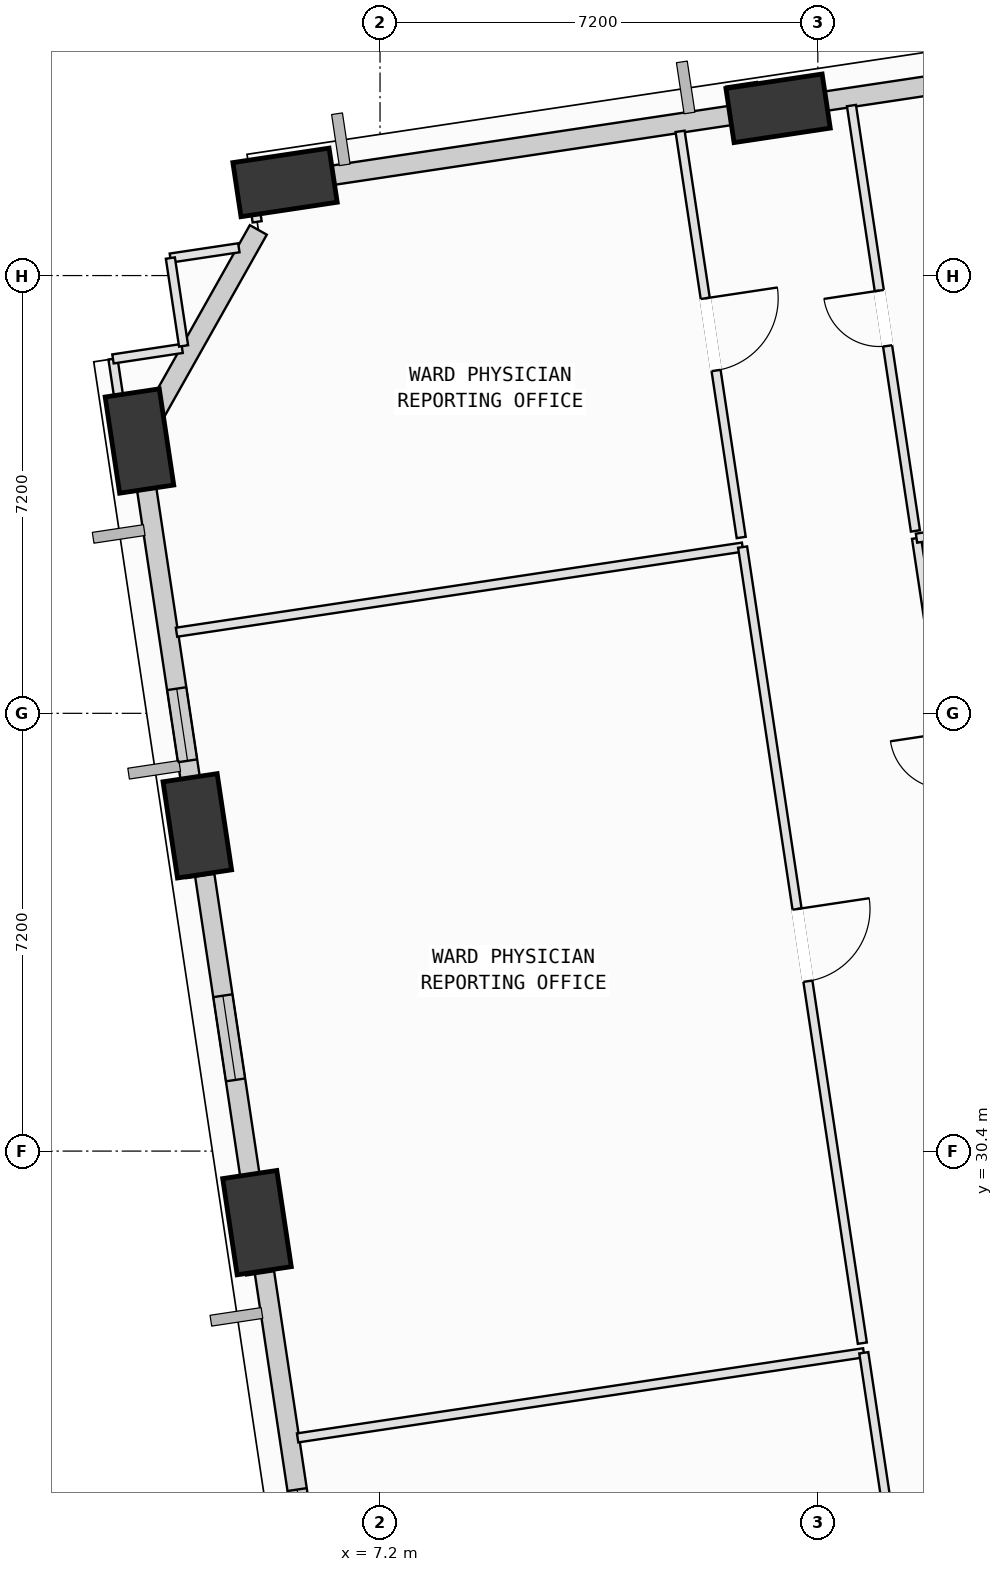
"""IFC4 building model, lengths in metres.
Left out: names, types, materials, properties, quantities, classifications, styles, units other than length and angle.
Written with IfcOpenShell. Run it as: python <this file> out.ifc"""

import sys

from ifc_helpers import new_model, si_unit, direction, frame, frame_2d, origin, origin_2d, place, context, subcontext, project, spatial, rectangle, extrude, element, fill, save


model = new_model("IFC4")
c1 = context("Model", 3, precision=1e-05, world=origin(), true_north=direction((0.0, 1.0)))
c2 = subcontext(c1, "Body", "Model", "MODEL_VIEW")
j1 = project(units=[si_unit("LENGTHUNIT", "METRE"), si_unit("PLANEANGLEUNIT", "RADIAN")], contexts=[c1])
p1 = place(None, origin())
s1 = spatial("IfcSite", under=j1, at=p1, CompositionType="ELEMENT")
p2 = place(p1, origin())
s2 = spatial("IfcBuilding", under=s1, at=p2, CompositionType="ELEMENT")
p3 = place(p2, frame((0.0, 0.0, 59.0)))
s3 = spatial("IfcBuildingStorey", under=s2, at=p3, CompositionType="ELEMENT", Elevation=59.0)
p4 = place(p3, frame((13.747, 47.551, 0.002), z_axis=(-0.092921619704, -0.082435357337, 0.992254999711), x_axis=(0.766615105201, -0.64184127574, 0.018467734958)))
e1 = element("IfcColumn", 1, at=p4, inside=s3, PredefinedType="COLUMN", context=c2, shape_type="SweptSolid", body=[
    extrude(rectangle(XDim=1.6, YDim=0.9, at=origin_2d()), origin(), (0.0, 0.0, 1.0), 4.028),
])
p5 = place(p3, frame((5.638, 46.332, 0.002), z_axis=(-0.087401375446, -0.115447183335, 0.989460937799), x_axis=(0.877219279252, -0.479607017273, 0.021527774881)))
e2 = element("IfcColumn", 2, at=p5, inside=s3, PredefinedType="COLUMN", context=c2, shape_type="SweptSolid", body=[
    extrude(rectangle(XDim=1.6, YDim=0.9, at=origin_2d()), origin(), (0.0, 0.0, 1.0), 4.039),
])
p6 = place(p3, frame((3.244, 42.079, 0.002), z_axis=(-0.06982815003, -0.125086097327, 0.989685554971), x_axis=(0.347229843734, 0.927018097082, 0.141664686156)))
e3 = element("IfcColumn", 3, at=p6, inside=s3, PredefinedType="COLUMN", context=c2, shape_type="SweptSolid", body=[
    extrude(rectangle(XDim=1.6, YDim=0.9, at=origin_2d()), origin(), (0.0, 0.0, 1.0), 4.038),
])
p7 = place(p3, frame((4.195, 35.75, 0.002), z_axis=(-0.043979168177, -0.121215310638, 0.991651491822), x_axis=(0.194699822044, 0.972539038983, 0.127513908846)))
e4 = element("IfcColumn", 4, at=p7, inside=s3, PredefinedType="COLUMN", context=c2, shape_type="SweptSolid", body=[
    extrude(rectangle(XDim=1.6, YDim=0.9, at=origin_2d()), origin(), (0.0, 0.0, 1.0), 4.03),
])
p8 = place(p3, frame((5.177, 29.223, 0.002), z_axis=(-0.017226797387, -0.117130090682, 0.99296715923), x_axis=(-0.00421044589, 0.993114222476, 0.117074391996)))
e5 = element("IfcColumn", 5, at=p8, inside=s3, PredefinedType="COLUMN", context=c2, shape_type="SweptSolid", body=[
    extrude(rectangle(XDim=1.6, YDim=0.9, at=origin_2d()), origin(), (0.0, 0.0, 1.0), 4.025),
])
p9 = place(p3, frame((14.125, 47.608, 0.0), z_axis=(0.0, 0.0, 1.0), x_axis=(0.988884639761, 0.1486847983, 0.0)))
e6 = element("IfcWall", 6, at=p9, inside=s3, PredefinedType="SOLIDWALL", context=c2, shape_type="SweptSolid", body=[
    extrude(rectangle(XDim=7.003, YDim=0.32, at=frame_2d((3.501, 0.0))), origin(), (0.0, 0.0, 1.0), 3.165),
])
p10 = place(p3, frame((5.997, 46.386, 0.0), z_axis=(0.0, 0.0, 1.0), x_axis=(0.988885892839, 0.14867646399, 0.0)))
e7 = element("IfcWall", 7, at=p10, inside=s3, PredefinedType="SOLIDWALL", context=c2, shape_type="SweptSolid", body=[
    extrude(rectangle(XDim=7.035, YDim=0.32, at=frame_2d((3.517, 0.0))), origin(), (0.0, 0.0, 1.0), 3.165),
])
p11 = place(p3, frame((3.4, 42.356, 0.0), z_axis=(0.0, 0.0, 1.0), x_axis=(0.490548940901, 0.871413642641, 0.0)))
e8 = element("IfcWall", 8, at=p11, inside=s3, PredefinedType="SOLIDWALL", context=c2, shape_type="SweptSolid", body=[
    extrude(rectangle(XDim=3.666, YDim=0.32, at=frame_2d((1.833, 0.0))), origin(), (0.0, 0.0, 1.0), 3.165),
])
p12 = place(p3, frame((4.141, 36.112, 0.0), z_axis=(0.0, 0.0, 1.0), x_axis=(-0.14868786964, 0.988884177961, 0.0)))
e9 = element("IfcWall", 9, at=p12, inside=s3, PredefinedType="SOLIDWALL", context=c2, shape_type="SweptSolid", body=[
    extrude(rectangle(XDim=5.223, YDim=0.32, at=frame_2d((2.612, 0.0))), origin(), (0.0, 0.0, 1.0), 3.165),
])
p13 = place(p12, frame((0.715, 0.0, 0.75)))
e10 = element("IfcOpeningElement", 10, at=p13, cuts=e9, PredefinedType="OPENING", context=c2, shape_type="SweptSolid", body=[
    extrude(rectangle(XDim=1.2, YDim=1.75, at=frame_2d((0.6, 0.875))), frame((0.0, 0.17, 0.0), z_axis=(0.0, -1.0, 0.0), x_axis=(1.0, 0.0, 0.0)), (0.0, 0.0, 1.0), 0.34),
])
p14 = place(p3, frame((5.121, 29.595, 0.0), z_axis=(0.0, 0.0, 1.0), x_axis=(-0.148683082454, 0.988884897747, 0.0)))
e11 = element("IfcWall", 11, at=p14, inside=s3, PredefinedType="SOLIDWALL", context=c2, shape_type="SweptSolid", body=[
    extrude(rectangle(XDim=5.401, YDim=0.32, at=frame_2d((2.7, 0.0))), origin(), (0.0, 0.0, 1.0), 3.165),
])
p15 = place(p14, frame((1.998, 0.0, 0.75)))
e12 = element("IfcOpeningElement", 12, at=p15, cuts=e11, PredefinedType="OPENING", context=c2, shape_type="SweptSolid", body=[
    extrude(rectangle(XDim=1.4, YDim=1.85, at=frame_2d((0.7, 0.925))), frame((0.0, 0.17, 0.0), z_axis=(0.0, -1.0, 0.0), x_axis=(1.0, 0.0, 0.0)), (0.0, 0.0, 1.0), 0.34),
])
p16 = place(p3, frame((6.109, 23.023, 0.0), z_axis=(0.0, 0.0, 1.0), x_axis=(-0.148652196075, 0.988889541153, 0.0)))
e13 = element("IfcWall", 13, at=p16, inside=s3, PredefinedType="SOLIDWALL", context=c2, shape_type="SweptSolid", body=[
    extrude(rectangle(XDim=5.438, YDim=0.32, at=frame_2d((2.719, 0.0))), origin(), (0.0, 0.0, 1.0), 3.165),
])
p17 = place(p16, frame((0.63, 0.0, 0.75)))
e14 = element("IfcOpeningElement", 14, at=p17, cuts=e13, PredefinedType="OPENING", context=c2, shape_type="SweptSolid", body=[
    extrude(rectangle(XDim=1.2, YDim=1.75, at=frame_2d((0.6, 0.875))), frame((0.0, 0.17, 0.0), z_axis=(0.0, -1.0, 0.0), x_axis=(1.0, 0.0, 0.0)), (0.0, 0.0, 1.0), 0.34),
])
p18 = place(p3, frame((5.845, 25.683, 0.0), z_axis=(0.0, 0.0, 1.0), x_axis=(0.988885704997, 0.148677713369, 0.0)))
e15 = element("IfcWall", 15, at=p18, inside=s3, PredefinedType="PARTITIONING", context=c2, shape_type="SweptSolid", body=[
    extrude(rectangle(XDim=9.416, YDim=0.15, at=frame_2d((4.708, 0.0))), origin(), (0.0, 0.0, 1.0), 3.78),
])
p19 = place(p3, frame((15.156, 27.083, 0.0), z_axis=(0.0, 0.0, 1.0), x_axis=(0.148580091248, -0.988900377432, 0.0)))
e16 = element("IfcWall", 16, at=p19, inside=s3, PredefinedType="PARTITIONING", context=c2, shape_type="SweptSolid", body=[
    extrude(rectangle(XDim=6.576, YDim=0.15, at=frame_2d((3.288, 0.0))), origin(), (0.0, 0.0, 1.0), 3.78),
])
p20 = place(p3, frame((3.853, 38.934, 0.0), z_axis=(0.0, 0.0, 1.0), x_axis=(0.988883411983, 0.148692963872, 0.0)))
e17 = element("IfcWall", 17, at=p20, inside=s3, PredefinedType="PARTITIONING", context=c2, shape_type="SweptSolid", body=[
    extrude(rectangle(XDim=9.415, YDim=0.15, at=frame_2d((4.708, 0.0))), origin(), (0.0, 0.0, 1.0), 3.78),
])
p21 = place(p3, frame((13.163, 40.334, 0.0), z_axis=(0.0, 0.0, 1.0), x_axis=(0.148712834823, -0.988880423893, 0.0)))
e18 = element("IfcWall", 18, at=p21, inside=s3, PredefinedType="PARTITIONING", context=c2, shape_type="SweptSolid", body=[
    extrude(rectangle(XDim=13.24, YDim=0.15, at=frame_2d((6.62, 0.0))), origin(), (0.0, 0.0, 1.0), 2.865),
])
p22 = place(p21, frame((6.02, 0.0, 0.0)))
e19 = element("IfcOpeningElement", 19, at=p22, cuts=e18, PredefinedType="OPENING", context=c2, shape_type="SweptSolid", body=[
    extrude(rectangle(XDim=1.2, YDim=2.15, at=frame_2d((0.6, 1.075))), frame((0.0, 0.085, 0.0), z_axis=(0.0, -1.0, 0.0), x_axis=(1.0, 0.0, 0.0)), (0.0, 0.0, 1.0), 0.17),
])
p23 = place(p3, frame((5.072, 28.366, 0.0), z_axis=(0.0, 0.0, 1.0), x_axis=(-0.148093458743, 0.988973370459, 0.0)))
e20 = element("IfcWall", 20, at=p23, inside=s3, PredefinedType="PARTITIONING", context=c2, shape_type="SweptSolid", body=[
    extrude(rectangle(XDim=1.208, YDim=0.15, at=frame_2d((0.604, 0.0))), origin(), (0.0, 0.0, 1.0), 3.165),
])
p24 = place(p3, frame((4.09, 34.901, 0.0), z_axis=(0.0, 0.0, 1.0), x_axis=(-0.148711563155, 0.988880615132, 0.0)))
e21 = element("IfcWall", 21, at=p24, inside=s3, PredefinedType="PARTITIONING", context=c2, shape_type="SweptSolid", body=[
    extrude(rectangle(XDim=1.19, YDim=0.15, at=frame_2d((0.595, 0.0))), origin(), (0.0, 0.0, 1.0), 3.165),
])
p25 = place(p3, frame((3.752, 45.088, 0.0), z_axis=(0.0, 0.0, 1.0), x_axis=(0.988898574791, 0.148592088537, 0.0)))
e22 = element("IfcWall", 22, at=p25, inside=s3, PredefinedType="PARTITIONING", context=c2, shape_type="SweptSolid", body=[
    extrude(rectangle(XDim=1.139, YDim=0.15, at=frame_2d((0.569, 0.0))), origin(), (0.0, 0.0, 1.0), 3.78),
])
p26 = place(p3, frame((5.179, 45.684, 0.0), z_axis=(0.0, 0.0, 1.0), x_axis=(-0.148050860535, 0.988979748374, 0.0)))
e23 = element("IfcWall", 23, at=p26, inside=s3, PredefinedType="PARTITIONING", context=c2, shape_type="SweptSolid", body=[
    extrude(rectangle(XDim=0.742, YDim=0.15, at=frame_2d((0.371, 0.0))), origin(), (0.0, 0.0, 1.0), 2.865),
])
p27 = place(p3, frame((5.069, 46.418, 0.0), z_axis=(0.0, 0.0, 1.0), x_axis=(0.9888459469, 0.1489419125, 0.0)))
e24 = element("IfcWall", 24, at=p27, inside=s3, PredefinedType="PARTITIONING", context=c2, shape_type="SweptSolid", body=[
    extrude(rectangle(XDim=0.913, YDim=0.15, at=frame_2d((0.457, 0.0))), origin(), (0.0, 0.0, 1.0), 3.78),
])
p28 = place(p3, frame((12.135, 47.172, 0.0), z_axis=(0.0, 0.0, 1.0), x_axis=(0.14875397829, -0.988874235655, 0.0)))
e25 = element("IfcWall", 25, at=p28, inside=s3, PredefinedType="PARTITIONING", context=c2, shape_type="SweptSolid", body=[
    extrude(rectangle(XDim=6.755, YDim=0.15, at=frame_2d((3.378, 0.0))), origin(), (0.0, 0.0, 1.0), 2.865),
])
p29 = place(p28, frame((2.778, 0.0, 0.0)))
e26 = element("IfcOpeningElement", 26, at=p29, cuts=e25, PredefinedType="OPENING", context=c2, shape_type="SweptSolid", body=[
    extrude(rectangle(XDim=1.2, YDim=2.15, at=frame_2d((0.6, 1.075))), frame((0.0, 0.085, 0.0), z_axis=(0.0, -1.0, 0.0), x_axis=(1.0, 0.0, 0.0)), (0.0, 0.0, 1.0), 0.17),
])
p30 = place(p3, frame((3.137, 41.243, 0.0), z_axis=(0.0, 0.0, 1.0), x_axis=(-0.148761674769, 0.988873077862, 0.0)))
e27 = element("IfcWall", 27, at=p30, inside=s3, PredefinedType="PARTITIONING", context=c2, shape_type="SweptSolid", body=[
    extrude(rectangle(XDim=2.211, YDim=0.15, at=frame_2d((1.105, 0.0))), origin(), (0.0, 0.0, 1.0), 3.165),
])
p31 = place(p3, frame((2.808, 43.429, 0.0), z_axis=(0.0, 0.0, 1.0), x_axis=(0.988734554704, 0.149679592241, 0.0)))
e28 = element("IfcWall", 28, at=p31, inside=s3, PredefinedType="PARTITIONING", context=c2, shape_type="SweptSolid", body=[
    extrude(rectangle(XDim=1.15, YDim=0.15, at=frame_2d((0.575, 0.0))), origin(), (0.0, 0.0, 1.0), 3.78),
])
p32 = place(p3, frame((3.969, 43.643, 0.0), z_axis=(0.0, 0.0, 1.0), x_axis=(-0.148552900816, 0.988904462352, 0.0)))
e29 = element("IfcWall", 29, at=p32, inside=s3, PredefinedType="PARTITIONING", context=c2, shape_type="SweptSolid", body=[
    extrude(rectangle(XDim=1.461, YDim=0.15, at=frame_2d((0.73, 0.0))), origin(), (0.0, 0.0, 1.0), 3.78),
])
p33 = place(p3, frame((17.123, 33.163, 0.0), z_axis=(0.0, 0.0, 1.0), x_axis=(-0.148659874273, 0.988888386918, 0.0)))
e30 = element("IfcWall", 30, at=p33, inside=s3, PredefinedType="PARTITIONING", context=c2, shape_type="SweptSolid", body=[
    extrude(rectangle(XDim=7.4, YDim=0.15, at=frame_2d((3.7, 0.0))), origin(), (0.0, 0.0, 1.0), 3.78),
])
p34 = place(p33, frame((3.24, 0.0, 0.0)))
e31 = element("IfcOpeningElement", 31, at=p34, cuts=e30, PredefinedType="OPENING", context=c2, shape_type="SweptSolid", body=[
    extrude(rectangle(XDim=0.92, YDim=2.1, at=frame_2d((0.46, 1.05))), frame((0.0, 0.085, 0.0), z_axis=(0.0, -1.0, 0.0), x_axis=(1.0, 0.0, 0.0)), (0.0, 0.0, 1.0), 0.17),
])
p35 = place(p3, frame((16.023, 40.481, 0.0), z_axis=(0.0, 0.0, 1.0), x_axis=(0.98887761826, 0.148731489955, 0.0)))
e32 = element("IfcWall", 32, at=p35, inside=s3, PredefinedType="PARTITIONING", context=c2, shape_type="SweptSolid", body=[
    extrude(rectangle(XDim=8.365, YDim=0.15, at=frame_2d((4.183, 0.0))), origin(), (0.0, 0.0, 1.0), 3.78),
])
p36 = place(p3, frame((16.005, 40.6, 0.0), z_axis=(0.0, 0.0, 1.0), x_axis=(-0.148703261216, 0.988881863573, 0.0)))
e33 = element("IfcWall", 33, at=p36, inside=s3, PredefinedType="PARTITIONING", context=c2, shape_type="SweptSolid", body=[
    extrude(rectangle(XDim=7.074, YDim=0.15, at=frame_2d((3.537, 0.0))), origin(), (0.0, 0.0, 1.0), 3.78),
])
p37 = place(p36, frame((3.077, 0.0, 0.0)))
e34 = element("IfcOpeningElement", 34, at=p37, cuts=e33, PredefinedType="OPENING", context=c2, shape_type="SweptSolid", body=[
    extrude(rectangle(XDim=0.92, YDim=2.1, at=frame_2d((0.46, 1.05))), frame((0.0, 0.085, 0.0), z_axis=(0.0, -1.0, 0.0), x_axis=(1.0, 0.0, 0.0)), (0.0, 0.0, 1.0), 0.17),
])
p38 = place(p13, origin())
e35 = element("IfcWindow", 35, at=p38, inside=s3, PartitioningType="SINGLE_PANEL", PredefinedType="WINDOW", context=c2, shape_type="SweptSolid", body=[
    extrude(rectangle(XDim=1.2, YDim=1.75, at=frame_2d((0.6, 0.875))), frame((0.0, 0.03, 0.0), z_axis=(0.0, -1.0, 0.0), x_axis=(1.0, 0.0, 0.0)), (0.0, 0.0, 1.0), 0.06),
])
fill(e10, e35)
p39 = place(p15, origin())
e36 = element("IfcWindow", 36, at=p39, inside=s3, PartitioningType="SINGLE_PANEL", PredefinedType="WINDOW", context=c2, shape_type="SweptSolid", body=[
    extrude(rectangle(XDim=1.4, YDim=1.85, at=frame_2d((0.7, 0.925))), frame((0.0, 0.03, 0.0), z_axis=(0.0, -1.0, 0.0), x_axis=(1.0, 0.0, 0.0)), (0.0, 0.0, 1.0), 0.06),
])
fill(e12, e36)
p40 = place(p17, origin())
e37 = element("IfcWindow", 37, at=p40, inside=s3, PartitioningType="SINGLE_PANEL", PredefinedType="WINDOW", context=c2, shape_type="SweptSolid", body=[
    extrude(rectangle(XDim=1.2, YDim=1.75, at=frame_2d((0.6, 0.875))), frame((0.0, 0.03, 0.0), z_axis=(0.0, -1.0, 0.0), x_axis=(1.0, 0.0, 0.0)), (0.0, 0.0, 1.0), 0.06),
])
fill(e14, e37)
p41 = place(p22, origin())
e38 = element("IfcDoor", 38, at=p41, inside=s3, OperationType="SINGLE_SWING_LEFT", PredefinedType="DOOR", context=c2, shape_type="SweptSolid", body=[
    extrude(rectangle(XDim=1.2, YDim=2.15, at=frame_2d((0.6, 1.075))), frame((0.0, 0.025, 0.0), z_axis=(0.0, -1.0, 0.0), x_axis=(1.0, 0.0, 0.0)), (0.0, 0.0, 1.0), 0.05),
])
fill(e19, e38)
p42 = place(p29, origin())
e39 = element("IfcDoor", 39, at=p42, inside=s3, OperationType="SINGLE_SWING_LEFT", PredefinedType="DOOR", context=c2, shape_type="SweptSolid", body=[
    extrude(rectangle(XDim=1.2, YDim=2.15, at=frame_2d((0.6, 1.075))), frame((0.0, 0.025, 0.0), z_axis=(0.0, -1.0, 0.0), x_axis=(1.0, 0.0, 0.0)), (0.0, 0.0, 1.0), 0.05),
])
fill(e26, e39)
p43 = place(p37, origin())
e40 = element("IfcDoor", 40, at=p43, inside=s3, OperationType="SINGLE_SWING_RIGHT", PredefinedType="DOOR", context=c2, shape_type="SweptSolid", body=[
    extrude(rectangle(XDim=0.92, YDim=2.1, at=frame_2d((0.46, 1.05))), frame((0.0, 0.025, 0.0), z_axis=(0.0, -1.0, 0.0), x_axis=(1.0, 0.0, 0.0)), (0.0, 0.0, 1.0), 0.05),
])
fill(e34, e40)
save(model, sys.argv[1])
